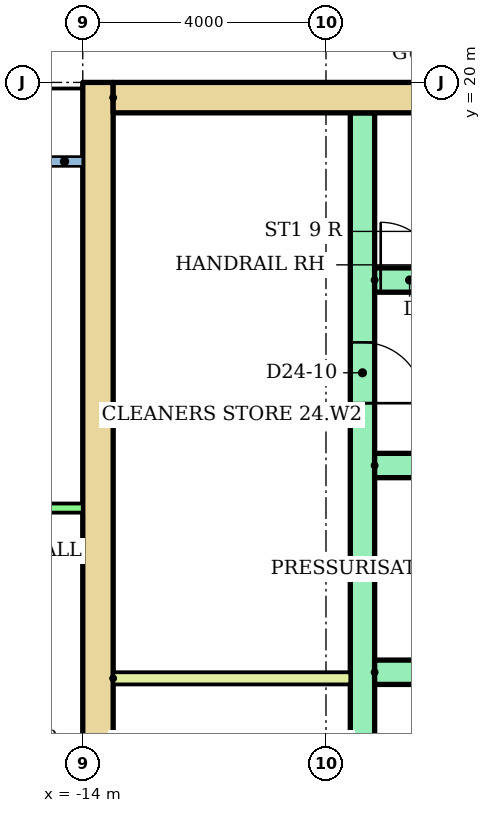
"""IFC4 building model, lengths in metres.
Left out: names, types, materials, properties, quantities, classifications, styles, units other than length and angle.
Written with IfcOpenShell. Run it as: python <this file> out.ifc"""

import sys

from ifc_helpers import new_model, si_unit, direction, frame, frame_2d, origin, place, context, subcontext, project, spatial, rectangle, extrude, element, fill, save


model = new_model("IFC4")
c1 = context("Model", 3, precision=1e-05, world=origin(), true_north=direction((0.0, 1.0)))
c2 = subcontext(c1, "Body", "Model", "MODEL_VIEW")
j1 = project(units=[si_unit("LENGTHUNIT", "METRE"), si_unit("PLANEANGLEUNIT", "RADIAN")], contexts=[c1])
p1 = place(None, origin())
s1 = spatial("IfcSite", under=j1, at=p1, CompositionType="ELEMENT")
p2 = place(p1, origin())
s2 = spatial("IfcBuilding", under=s1, at=p2, CompositionType="ELEMENT")
p3 = place(p2, frame((0.0, 0.0, 93.5)))
s3 = spatial("IfcBuildingStorey", under=s2, at=p3, CompositionType="ELEMENT", Elevation=93.5)
p4 = place(p3, frame((-13.75, 3.0, 0.0), z_axis=(0.0, 0.0, 1.0), x_axis=(0.0, 1.0, 0.0)))
e1 = element("IfcWall", 1, at=p4, inside=s3, PredefinedType="SHEAR", context=c2, shape_type="SweptSolid", body=[
    extrude(rectangle(XDim=17.0, YDim=0.5, at=frame_2d((8.5, 0.0))), origin(), (0.0, 0.0, 1.0), 2.92),
])
p5 = place(p3, frame((-13.5, 19.75, 0.0)))
e2 = element("IfcWall", 2, at=p5, inside=s3, PredefinedType="SHEAR", context=c2, shape_type="SweptSolid", body=[
    extrude(rectangle(XDim=27.0, YDim=0.5, at=frame_2d((13.5, 0.0))), origin(), (0.0, 0.0, 1.0), 2.92),
])
p6 = place(p3, frame((-9.4, 6.8, 0.0), z_axis=(0.0, 0.0, 1.0), x_axis=(0.0, 1.0, 0.0)))
e3 = element("IfcWall", 3, at=p6, inside=s3, PredefinedType="SHEAR", context=c2, shape_type="SweptSolid", body=[
    extrude(rectangle(XDim=12.7, YDim=0.4, at=frame_2d((6.35, 0.0))), origin(), (0.0, 0.0, 1.0), 2.92),
])
p7 = place(p6, frame((1.15, 0.0, 0.0)))
e4 = element("IfcOpeningElement", 4, at=p7, cuts=e3, PredefinedType="OPENING", context=c2, shape_type="SweptSolid", body=[
    extrude(rectangle(XDim=1.0, YDim=2.1, at=frame_2d((0.5, 1.05))), frame((0.0, 0.21, 0.0), z_axis=(0.0, -1.0, 0.0), x_axis=(1.0, 0.0, 0.0)), (0.0, 0.0, 1.0), 0.42),
])
p8 = place(p6, frame((7.925, 0.0, 0.0)))
e5 = element("IfcOpeningElement", 5, at=p8, cuts=e3, PredefinedType="OPENING", context=c2, shape_type="SweptSolid", body=[
    extrude(rectangle(XDim=1.0, YDim=2.1, at=frame_2d((0.5, 1.05))), frame((0.0, 0.21, 0.0), z_axis=(0.0, -1.0, 0.0), x_axis=(1.0, 0.0, 0.0)), (0.0, 0.0, 1.0), 0.42),
])
p9 = place(p3, frame((-9.2, 10.3, 0.0)))
e6 = element("IfcWall", 6, at=p9, inside=s3, PredefinedType="SHEAR", context=c2, shape_type="SweptSolid", body=[
    extrude(rectangle(XDim=8.0, YDim=0.4, at=frame_2d((4.0, 0.0))), origin(), (0.0, 0.0, 1.0), 2.92),
])
p10 = place(p9, frame((2.033, 0.0, 0.0)))
e7 = element("IfcOpeningElement", 7, at=p10, cuts=e6, PredefinedType="OPENING", context=c2, shape_type="SweptSolid", body=[
    extrude(rectangle(XDim=1.0, YDim=2.1, at=frame_2d((0.5, 1.05))), frame((0.0, 0.21, 0.0), z_axis=(0.0, -1.0, 0.0), x_axis=(1.0, 0.0, 0.0)), (0.0, 0.0, 1.0), 0.42),
])
p11 = place(p9, frame((6.133, 0.0, 0.0)))
e8 = element("IfcOpeningElement", 8, at=p11, cuts=e6, PredefinedType="OPENING", context=c2, shape_type="SweptSolid", body=[
    extrude(rectangle(XDim=1.0, YDim=2.1, at=frame_2d((0.5, 1.05))), frame((0.0, 0.21, 0.0), z_axis=(0.0, -1.0, 0.0), x_axis=(1.0, 0.0, 0.0)), (0.0, 0.0, 1.0), 0.42),
])
p12 = place(p3, frame((-9.2, 13.7, 0.0)))
e9 = element("IfcWall", 9, at=p12, inside=s3, PredefinedType="SHEAR", context=c2, shape_type="SweptSolid", body=[
    extrude(rectangle(XDim=8.0, YDim=0.4, at=frame_2d((4.0, 0.0))), origin(), (0.0, 0.0, 1.0), 2.92),
])
p13 = place(p3, frame((-9.2, 16.75, 0.0)))
e10 = element("IfcWall", 10, at=p13, inside=s3, PredefinedType="SHEAR", context=c2, shape_type="SweptSolid", body=[
    extrude(rectangle(XDim=18.4, YDim=0.4, at=frame_2d((9.2, 0.0))), origin(), (0.0, 0.0, 1.0), 2.92),
])
p14 = place(p13, frame((0.1, 0.0, 0.0)))
e11 = element("IfcOpeningElement", 11, at=p14, cuts=e10, PredefinedType="OPENING", context=c2, shape_type="SweptSolid", body=[
    extrude(rectangle(XDim=0.95, YDim=2.1, at=frame_2d((0.475, 1.05))), frame((0.0, 0.21, 0.0), z_axis=(0.0, -1.0, 0.0), x_axis=(1.0, 0.0, 0.0)), (0.0, 0.0, 1.0), 0.42),
])
p15 = place(p13, frame((6.1, 0.0, 0.0)))
e12 = element("IfcOpeningElement", 12, at=p15, cuts=e10, PredefinedType="OPENING", context=c2, shape_type="SweptSolid", body=[
    extrude(rectangle(XDim=0.95, YDim=2.1, at=frame_2d((0.475, 1.05))), frame((0.0, 0.21, 0.0), z_axis=(0.0, -1.0, 0.0), x_axis=(1.0, 0.0, 0.0)), (0.0, 0.0, 1.0), 0.42),
])
p16 = place(p13, frame((12.1, 0.0, 0.0)))
e13 = element("IfcOpeningElement", 13, at=p16, cuts=e10, PredefinedType="OPENING", context=c2, shape_type="SweptSolid", body=[
    extrude(rectangle(XDim=0.95, YDim=2.1, at=frame_2d((0.475, 1.05))), frame((0.0, 0.21, 0.0), z_axis=(0.0, -1.0, 0.0), x_axis=(1.0, 0.0, 0.0)), (0.0, 0.0, 1.0), 0.42),
])
p17 = place(p3, frame((-13.5, 10.2, 0.0)))
e14 = element("IfcWall", 14, at=p17, inside=s3, PredefinedType="PARTITIONING", context=c2, shape_type="SweptSolid", body=[
    extrude(rectangle(XDim=3.9, YDim=0.2, at=frame_2d((1.95, 0.0))), origin(), (0.0, 0.0, 1.0), 2.92),
])
p18 = place(p3, frame((-28.62, 13.0, 0.0)))
e15 = element("IfcWall", 15, at=p18, inside=s3, PredefinedType="PARTITIONING", context=c2, shape_type="SweptSolid", body=[
    extrude(rectangle(XDim=14.62, YDim=0.15, at=frame_2d((7.31, 0.0))), origin(), (0.0, 0.0, 1.0), 2.4),
])
p19 = place(p18, frame((1.97, 0.0, 0.0)))
e16 = element("IfcOpeningElement", 16, at=p19, cuts=e15, PredefinedType="OPENING", context=c2, shape_type="SweptSolid", body=[
    extrude(rectangle(XDim=1.0, YDim=2.1, at=frame_2d((0.5, 1.05))), frame((0.0, 0.085, 0.0), z_axis=(0.0, -1.0, 0.0), x_axis=(1.0, 0.0, 0.0)), (0.0, 0.0, 1.0), 0.17),
])
p20 = place(p18, frame((9.22, 0.0, 0.0)))
e17 = element("IfcOpeningElement", 17, at=p20, cuts=e15, PredefinedType="OPENING", context=c2, shape_type="SweptSolid", body=[
    extrude(rectangle(XDim=0.9, YDim=2.1, at=frame_2d((0.45, 1.05))), frame((0.0, 0.085, 0.0), z_axis=(0.0, -1.0, 0.0), x_axis=(1.0, 0.0, 0.0)), (0.0, 0.0, 1.0), 0.17),
])
p21 = place(p14, origin())
e18 = element("IfcDoor", 18, at=p21, inside=s3, OperationType="SINGLE_SWING_LEFT", PredefinedType="DOOR", context=c2, shape_type="SweptSolid", body=[
    extrude(rectangle(XDim=0.95, YDim=2.1, at=frame_2d((0.475, 1.05))), frame((0.0, 0.025, 0.0), z_axis=(0.0, -1.0, 0.0), x_axis=(1.0, 0.0, 0.0)), (0.0, 0.0, 1.0), 0.05),
])
fill(e11, e18)
p22 = place(p8, frame((1.0, 0.0, 0.0), z_axis=(0.0, 0.0, 1.0), x_axis=(-1.0, 0.0, 0.0)))
e19 = element("IfcDoor", 19, at=p22, inside=s3, OperationType="SINGLE_SWING_LEFT", PredefinedType="DOOR", context=c2, shape_type="SweptSolid", body=[
    extrude(rectangle(XDim=1.0, YDim=2.1, at=frame_2d((0.5, 1.05))), frame((0.0, 0.025, 0.0), z_axis=(0.0, -1.0, 0.0), x_axis=(1.0, 0.0, 0.0)), (0.0, 0.0, 1.0), 0.05),
])
fill(e5, e19)
save(model, sys.argv[1])
